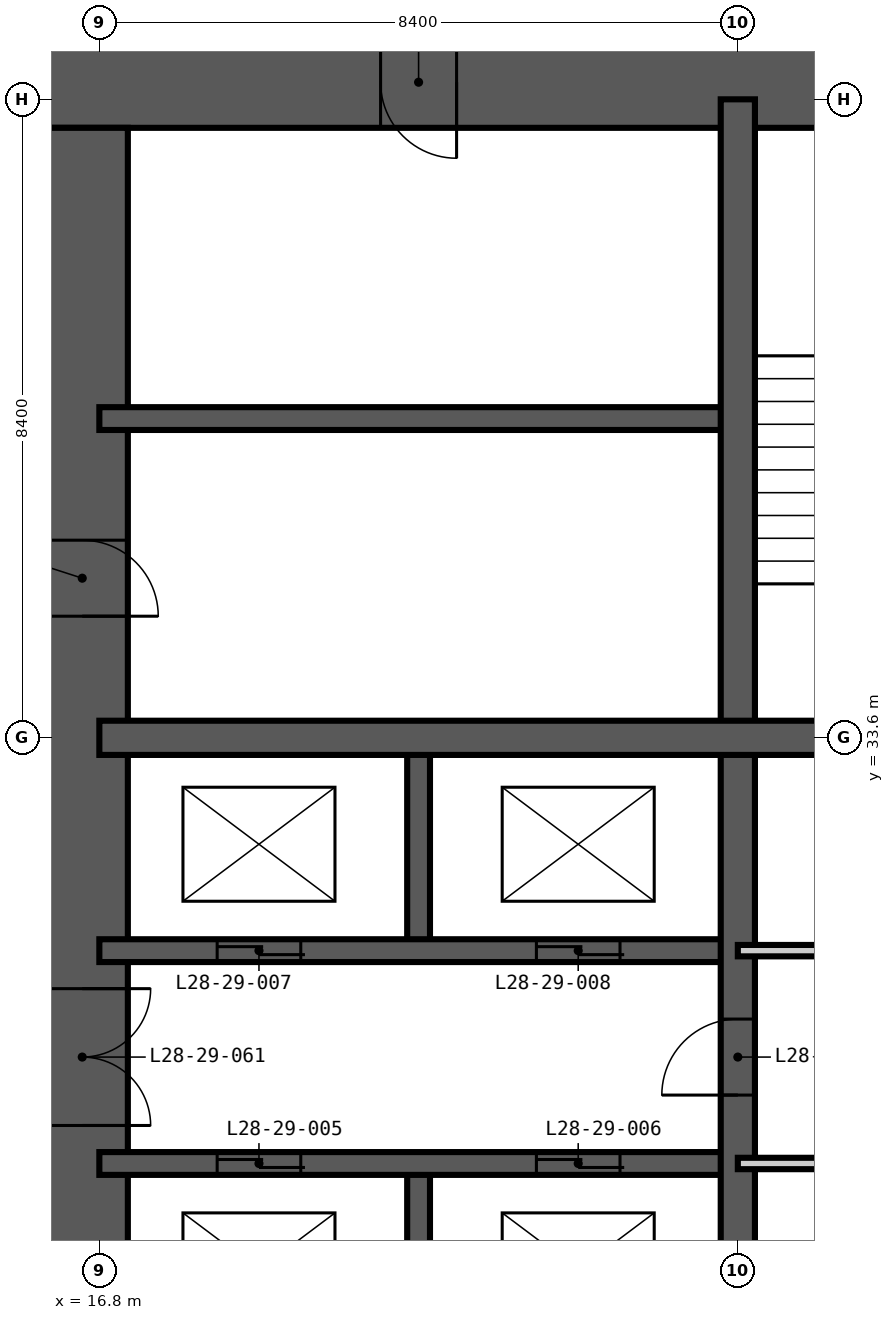
"""IFC4 building model, lengths in metres.
Left out: names, types, materials, properties, quantities, classifications, styles, units other than length and angle.
Written with IfcOpenShell. Run it as: python <this file> out.ifc"""

import sys

from ifc_helpers import new_model, si_unit, direction, frame, frame_2d, origin, place, context, subcontext, project, spatial, rectangle, extrude, element, fill, save


model = new_model("IFC4")
c1 = context("Model", 3, precision=1e-05, world=origin(), true_north=direction((0.0, 1.0)))
c2 = subcontext(c1, "Body", "Model", "MODEL_VIEW")
j1 = project(units=[si_unit("LENGTHUNIT", "METRE"), si_unit("PLANEANGLEUNIT", "RADIAN")], contexts=[c1])
p1 = place(None, origin())
s1 = spatial("IfcSite", under=j1, at=p1, CompositionType="ELEMENT")
p2 = place(p1, origin())
s2 = spatial("IfcBuilding", under=s1, at=p2, CompositionType="ELEMENT")
p3 = place(p2, frame((0.0, 0.0, 111.6)))
s3 = spatial("IfcBuildingStorey", under=s2, at=p3, CompositionType="ELEMENT", Elevation=111.6)
p4 = place(p3, frame((42.825, 42.225, -0.35), z_axis=(0.0, 0.0, 1.0), x_axis=(-1.0, 0.0, 0.0)))
e1 = element("IfcWall", 1, at=p4, inside=s3, PredefinedType="SHEAR", context=c2, shape_type="SweptSolid", body=[
    extrude(rectangle(XDim=26.85, YDim=1.2, at=frame_2d((13.425, 0.0))), origin(), (0.0, 0.0, 1.0), 3.6),
])
p5 = place(p4, frame((21.325, 0.0, 0.35)))
e2 = element("IfcOpeningElement", 2, at=p5, cuts=e1, PredefinedType="OPENING", context=c2, shape_type="SweptSolid", body=[
    extrude(rectangle(XDim=1.0, YDim=2.1, at=frame_2d((0.5, 1.05))), frame((0.0, 0.61, 0.0), z_axis=(0.0, -1.0, 0.0), x_axis=(1.0, 0.0, 0.0)), (0.0, 0.0, 1.0), 1.22),
])
p6 = place(p4, frame((10.725, 0.0, 0.35)))
e3 = element("IfcOpeningElement", 3, at=p6, cuts=e1, PredefinedType="OPENING", context=c2, shape_type="SweptSolid", body=[
    extrude(rectangle(XDim=1.2, YDim=2.2, at=frame_2d((0.6, 1.1))), frame((0.0, 0.61, 0.0), z_axis=(0.0, -1.0, 0.0), x_axis=(1.0, 0.0, 0.0)), (0.0, 0.0, 1.0), 1.22),
])
p7 = place(p3, frame((16.575, 41.625, -0.35), z_axis=(0.0, 0.0, 1.0), x_axis=(0.0, -1.0, 0.0)))
e4 = element("IfcWall", 4, at=p7, inside=s3, PredefinedType="SHEAR", context=c2, shape_type="SweptSolid", body=[
    extrude(rectangle(XDim=24.45, YDim=1.2, at=frame_2d((12.225, 0.0))), origin(), (0.0, 0.0, 1.0), 3.6),
])
p8 = place(p7, frame((11.325, 0.0, 0.35)))
e5 = element("IfcOpeningElement", 5, at=p8, cuts=e4, PredefinedType="OPENING", context=c2, shape_type="SweptSolid", body=[
    extrude(rectangle(XDim=1.8, YDim=2.2, at=frame_2d((0.9, 1.1))), frame((0.0, 0.61, 0.0), z_axis=(0.0, -1.0, 0.0), x_axis=(1.0, 0.0, 0.0)), (0.0, 0.0, 1.0), 1.22),
])
p9 = place(p7, frame((20.125, 0.0, 0.35)))
e6 = element("IfcOpeningElement", 6, at=p9, cuts=e4, PredefinedType="OPENING", context=c2, shape_type="SweptSolid", body=[
    extrude(rectangle(XDim=1.0, YDim=2.1, at=frame_2d((0.5, 1.05))), frame((0.0, 0.61, 0.0), z_axis=(0.0, -1.0, 0.0), x_axis=(1.0, 0.0, 0.0)), (0.0, 0.0, 1.0), 1.22),
])
p10 = place(p7, frame((5.425, 0.0, 0.35)))
e7 = element("IfcOpeningElement", 7, at=p10, cuts=e4, PredefinedType="OPENING", context=c2, shape_type="SweptSolid", body=[
    extrude(rectangle(XDim=1.0, YDim=2.1, at=frame_2d((0.5, 1.05))), frame((0.0, 0.61, 0.0), z_axis=(0.0, -1.0, 0.0), x_axis=(1.0, 0.0, 0.0)), (0.0, 0.0, 1.0), 1.22),
])
p11 = place(p3, frame((21.0, 22.4, -0.35), z_axis=(0.0, 0.0, 1.0), x_axis=(0.0, 1.0, 0.0)))
e8 = element("IfcWall", 8, at=p11, inside=s3, PredefinedType="SHEAR", context=c2, shape_type="SweptSolid", body=[
    extrude(rectangle(XDim=5.6, YDim=0.3, at=frame_2d((2.8, 0.0))), origin(), (0.0, 0.0, 1.0), 3.6),
])
p12 = place(p3, frame((21.0, 30.8, -0.35), z_axis=(0.0, 0.0, 1.0), x_axis=(0.0, 1.0, 0.0)))
e9 = element("IfcWall", 9, at=p12, inside=s3, PredefinedType="SHEAR", context=c2, shape_type="SweptSolid", body=[
    extrude(rectangle(XDim=2.8, YDim=0.3, at=frame_2d((1.4, 0.0))), origin(), (0.0, 0.0, 1.0), 3.6),
])
p13 = place(p3, frame((16.8, 28.0, -0.35), z_axis=(0.0, 0.0, 1.0), x_axis=(1.0, 0.0, 0.0)))
e10 = element("IfcWall", 10, at=p13, inside=s3, PredefinedType="SHEAR", context=c2, shape_type="SweptSolid", body=[
    extrude(rectangle(XDim=8.4, YDim=0.3, at=frame_2d((4.2, 0.0))), origin(), (0.0, 0.0, 1.0), 3.6),
])
p14 = place(p13, frame((1.55, 0.0, 0.35)))
e11 = element("IfcOpeningElement", 11, at=p14, cuts=e10, PredefinedType="OPENING", context=c2, shape_type="SweptSolid", body=[
    extrude(rectangle(XDim=1.1, YDim=2.2, at=frame_2d((0.55, 1.1))), frame((0.0, 0.16, 0.0), z_axis=(0.0, -1.0, 0.0), x_axis=(1.0, 0.0, 0.0)), (0.0, 0.0, 1.0), 0.32),
])
p15 = place(p13, frame((5.75, 0.0, 0.35)))
e12 = element("IfcOpeningElement", 12, at=p15, cuts=e10, PredefinedType="OPENING", context=c2, shape_type="SweptSolid", body=[
    extrude(rectangle(XDim=1.1, YDim=2.2, at=frame_2d((0.55, 1.1))), frame((0.0, 0.16, 0.0), z_axis=(0.0, -1.0, 0.0), x_axis=(1.0, 0.0, 0.0)), (0.0, 0.0, 1.0), 0.32),
])
p16 = place(p3, frame((16.8, 30.8, -0.35), z_axis=(0.0, 0.0, 1.0), x_axis=(1.0, 0.0, 0.0)))
e13 = element("IfcWall", 13, at=p16, inside=s3, PredefinedType="SHEAR", context=c2, shape_type="SweptSolid", body=[
    extrude(rectangle(XDim=8.4, YDim=0.3, at=frame_2d((4.2, 0.0))), origin(), (0.0, 0.0, 1.0), 3.6),
])
p17 = place(p16, frame((1.55, 0.0, 0.35)))
e14 = element("IfcOpeningElement", 14, at=p17, cuts=e13, PredefinedType="OPENING", context=c2, shape_type="SweptSolid", body=[
    extrude(rectangle(XDim=1.1, YDim=2.2, at=frame_2d((0.55, 1.1))), frame((0.0, 0.16, 0.0), z_axis=(0.0, -1.0, 0.0), x_axis=(1.0, 0.0, 0.0)), (0.0, 0.0, 1.0), 0.32),
])
p18 = place(p16, frame((5.75, 0.0, 0.35)))
e15 = element("IfcOpeningElement", 15, at=p18, cuts=e13, PredefinedType="OPENING", context=c2, shape_type="SweptSolid", body=[
    extrude(rectangle(XDim=1.1, YDim=2.2, at=frame_2d((0.55, 1.1))), frame((0.0, 0.16, 0.0), z_axis=(0.0, -1.0, 0.0), x_axis=(1.0, 0.0, 0.0)), (0.0, 0.0, 1.0), 0.32),
])
p19 = place(p3, frame((16.8, 37.8, -0.35), z_axis=(0.0, 0.0, 1.0), x_axis=(1.0, 0.0, 0.0)))
e16 = element("IfcWall", 16, at=p19, inside=s3, PredefinedType="SHEAR", context=c2, shape_type="SweptSolid", body=[
    extrude(rectangle(XDim=8.4, YDim=0.3, at=frame_2d((4.2, 0.0))), origin(), (0.0, 0.0, 1.0), 3.6),
])
p20 = place(p3, frame((25.2, 16.8, -0.35), z_axis=(0.0, 0.0, 1.0), x_axis=(0.0, 1.0, 0.0)))
e17 = element("IfcWall", 17, at=p20, inside=s3, PredefinedType="SHEAR", context=c2, shape_type="SweptSolid", body=[
    extrude(rectangle(XDim=25.2, YDim=0.45, at=frame_2d((12.6, 0.0))), origin(), (0.0, 0.0, 1.0), 3.6),
])
p21 = place(p20, frame((12.1, 0.0, 0.35)))
e18 = element("IfcOpeningElement", 18, at=p21, cuts=e17, PredefinedType="OPENING", context=c2, shape_type="SweptSolid", body=[
    extrude(rectangle(XDim=1.0, YDim=2.1, at=frame_2d((0.5, 1.05))), frame((0.0, 0.235, 0.0), z_axis=(0.0, -1.0, 0.0), x_axis=(1.0, 0.0, 0.0)), (0.0, 0.0, 1.0), 0.47),
])
p22 = place(p3, frame((16.8, 33.6, -0.35), z_axis=(0.0, 0.0, 1.0), x_axis=(1.0, 0.0, 0.0)))
e19 = element("IfcWall", 19, at=p22, inside=s3, PredefinedType="SHEAR", context=c2, shape_type="SweptSolid", body=[
    extrude(rectangle(XDim=25.2, YDim=0.45, at=frame_2d((12.6, 0.0))), origin(), (0.0, 0.0, 1.0), 3.6),
])
p23 = place(p22, frame((22.6, 0.0, 0.35)))
e20 = element("IfcOpeningElement", 20, at=p23, cuts=e19, PredefinedType="OPENING", context=c2, shape_type="SweptSolid", body=[
    extrude(rectangle(XDim=1.0, YDim=2.1, at=frame_2d((0.5, 1.05))), frame((0.0, 0.235, 0.0), z_axis=(0.0, -1.0, 0.0), x_axis=(1.0, 0.0, 0.0)), (0.0, 0.0, 1.0), 0.47),
])
p24 = place(p3, frame((25.2, 28.0, 0.0), z_axis=(0.0, 0.0, 1.0), x_axis=(1.0, 0.0, 0.0)))
e21 = element("IfcWall", 21, at=p24, inside=s3, PredefinedType="PARTITIONING", context=c2, shape_type="SweptSolid", body=[
    extrude(rectangle(XDim=8.4, YDim=0.15, at=frame_2d((4.2, 0.0))), origin(), (0.0, 0.0, 1.0), 3.25),
])
p25 = place(p24, frame((1.6, 0.0, 0.0)))
e22 = element("IfcOpeningElement", 22, at=p25, cuts=e21, PredefinedType="OPENING", context=c2, shape_type="SweptSolid", body=[
    extrude(rectangle(XDim=1.0, YDim=2.1, at=frame_2d((0.5, 1.05))), frame((0.0, 0.085, 0.0), z_axis=(0.0, -1.0, 0.0), x_axis=(1.0, 0.0, 0.0)), (0.0, 0.0, 1.0), 0.17),
])
p26 = place(p24, frame((5.8, 0.0, 0.0)))
e23 = element("IfcOpeningElement", 23, at=p26, cuts=e21, PredefinedType="OPENING", context=c2, shape_type="SweptSolid", body=[
    extrude(rectangle(XDim=1.0, YDim=2.1, at=frame_2d((0.5, 1.05))), frame((0.0, 0.085, 0.0), z_axis=(0.0, -1.0, 0.0), x_axis=(1.0, 0.0, 0.0)), (0.0, 0.0, 1.0), 0.17),
])
p27 = place(p3, frame((25.2, 30.8, 0.0), z_axis=(0.0, 0.0, 1.0), x_axis=(1.0, 0.0, 0.0)))
e24 = element("IfcWall", 24, at=p27, inside=s3, PredefinedType="PARTITIONING", context=c2, shape_type="SweptSolid", body=[
    extrude(rectangle(XDim=8.4, YDim=0.15, at=frame_2d((4.2, 0.0))), origin(), (0.0, 0.0, 1.0), 3.25),
])
p28 = place(p27, frame((3.7, 0.0, 0.0)))
e25 = element("IfcOpeningElement", 25, at=p28, cuts=e24, PredefinedType="OPENING", context=c2, shape_type="SweptSolid", body=[
    extrude(rectangle(XDim=1.0, YDim=2.1, at=frame_2d((0.5, 1.05))), frame((0.0, 0.085, 0.0), z_axis=(0.0, -1.0, 0.0), x_axis=(1.0, 0.0, 0.0)), (0.0, 0.0, 1.0), 0.17),
])
p29 = place(p14, origin())
e26 = element("IfcDoor", 26, at=p29, inside=s3, OperationType="DOUBLE_DOOR_SLIDING", PredefinedType="DOOR", context=c2, shape_type="SweptSolid", body=[
    extrude(rectangle(XDim=1.1, YDim=2.2, at=frame_2d((0.55, 1.1))), frame((0.0, 0.025, 0.0), z_axis=(0.0, -1.0, 0.0), x_axis=(1.0, 0.0, 0.0)), (0.0, 0.0, 1.0), 0.05),
])
fill(e11, e26)
p30 = place(p15, origin())
e27 = element("IfcDoor", 27, at=p30, inside=s3, OperationType="DOUBLE_DOOR_SLIDING", PredefinedType="DOOR", context=c2, shape_type="SweptSolid", body=[
    extrude(rectangle(XDim=1.1, YDim=2.2, at=frame_2d((0.55, 1.1))), frame((0.0, 0.025, 0.0), z_axis=(0.0, -1.0, 0.0), x_axis=(1.0, 0.0, 0.0)), (0.0, 0.0, 1.0), 0.05),
])
fill(e12, e27)
p31 = place(p17, origin())
e28 = element("IfcDoor", 28, at=p31, inside=s3, OperationType="DOUBLE_DOOR_SLIDING", PredefinedType="DOOR", context=c2, shape_type="SweptSolid", body=[
    extrude(rectangle(XDim=1.1, YDim=2.2, at=frame_2d((0.55, 1.1))), frame((0.0, 0.025, 0.0), z_axis=(0.0, -1.0, 0.0), x_axis=(1.0, 0.0, 0.0)), (0.0, 0.0, 1.0), 0.05),
])
fill(e14, e28)
p32 = place(p18, origin())
e29 = element("IfcDoor", 29, at=p32, inside=s3, OperationType="DOUBLE_DOOR_SLIDING", PredefinedType="DOOR", context=c2, shape_type="SweptSolid", body=[
    extrude(rectangle(XDim=1.1, YDim=2.2, at=frame_2d((0.55, 1.1))), frame((0.0, 0.025, 0.0), z_axis=(0.0, -1.0, 0.0), x_axis=(1.0, 0.0, 0.0)), (0.0, 0.0, 1.0), 0.05),
])
fill(e15, e29)
p33 = place(p8, origin())
e30 = element("IfcDoor", 30, at=p33, inside=s3, OperationType="DOUBLE_DOOR_DOUBLE_SWING", PredefinedType="DOOR", context=c2, shape_type="SweptSolid", body=[
    extrude(rectangle(XDim=1.8, YDim=2.2, at=frame_2d((0.9, 1.1))), frame((0.0, 0.025, 0.0), z_axis=(0.0, -1.0, 0.0), x_axis=(1.0, 0.0, 0.0)), (0.0, 0.0, 1.0), 0.05),
])
fill(e5, e30)
p34 = place(p10, origin())
e31 = element("IfcDoor", 31, at=p34, inside=s3, OperationType="SINGLE_SWING_RIGHT", PredefinedType="DOOR", context=c2, shape_type="SweptSolid", body=[
    extrude(rectangle(XDim=1.0, YDim=2.1, at=frame_2d((0.5, 1.05))), frame((0.0, 0.025, 0.0), z_axis=(0.0, -1.0, 0.0), x_axis=(1.0, 0.0, 0.0)), (0.0, 0.0, 1.0), 0.05),
])
fill(e7, e31)
p35 = place(p5, origin())
e32 = element("IfcDoor", 32, at=p35, inside=s3, OperationType="SINGLE_SWING_LEFT", PredefinedType="DOOR", context=c2, shape_type="SweptSolid", body=[
    extrude(rectangle(XDim=1.0, YDim=2.1, at=frame_2d((0.5, 1.05))), frame((0.0, 0.025, 0.0), z_axis=(0.0, -1.0, 0.0), x_axis=(1.0, 0.0, 0.0)), (0.0, 0.0, 1.0), 0.05),
])
fill(e2, e32)
p36 = place(p21, origin())
e33 = element("IfcDoor", 33, at=p36, inside=s3, OperationType="SINGLE_SWING_LEFT", PredefinedType="DOOR", context=c2, shape_type="SweptSolid", body=[
    extrude(rectangle(XDim=1.0, YDim=2.1, at=frame_2d((0.5, 1.05))), frame((0.0, 0.025, 0.0), z_axis=(0.0, -1.0, 0.0), x_axis=(1.0, 0.0, 0.0)), (0.0, 0.0, 1.0), 0.05),
])
fill(e18, e33)
save(model, sys.argv[1])
